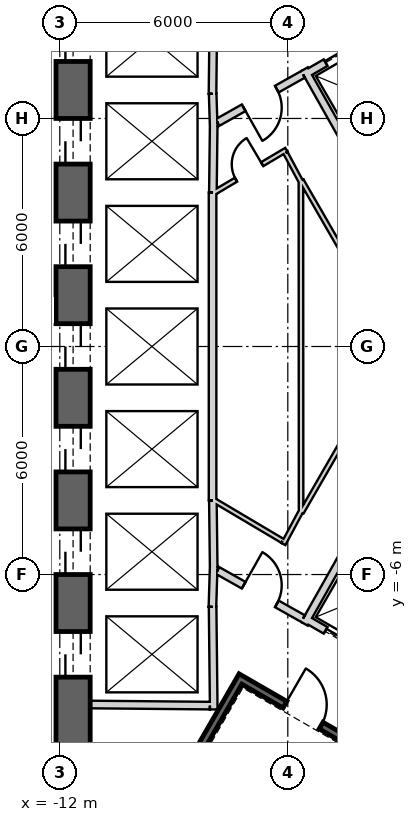
"""IFC4 building model, lengths in metres.
Left out: names, types, materials, properties, quantities, classifications, styles, units other than length and angle.
Written with IfcOpenShell. Run it as: python <this file> out.ifc"""

import sys

from ifc_helpers import new_model, si_unit, direction, frame, frame_2d, origin, place, context, subcontext, project, spatial, rectangle, extrude, element, fill, save


model = new_model("IFC4")
c1 = context("Model", 3, precision=1e-05, world=origin(), true_north=direction((0.0, 1.0)))
c2 = subcontext(c1, "Body", "Model", "MODEL_VIEW")
j1 = project(units=[si_unit("LENGTHUNIT", "METRE"), si_unit("PLANEANGLEUNIT", "RADIAN")], contexts=[c1])
p1 = place(None, origin())
s1 = spatial("IfcSite", under=j1, at=p1, CompositionType="ELEMENT")
p2 = place(p1, origin())
s2 = spatial("IfcBuilding", under=s1, at=p2, CompositionType="ELEMENT")
p3 = place(p2, frame((0.0, 0.0, 298.7)))
s3 = spatial("IfcBuildingStorey", under=s2, at=p3, CompositionType="ELEMENT", Elevation=298.7)
p4 = place(p3, frame((19.475, 2.208, 0.0), z_axis=(0.0, 0.0, 1.0), x_axis=(-0.866028369851, 0.499994862586, 0.0)))
e1 = element("IfcWall", 1, at=p4, inside=s3, PredefinedType="SHEAR", context=c2, shape_type="SweptSolid", body=[
    extrude(rectangle(XDim=31.523, YDim=0.9, at=frame_2d((15.762, 0.0))), origin(), (0.0, 0.0, 1.0), 3.9),
])
p5 = place(p4, frame((7.062, 0.0, 0.0)))
e2 = element("IfcOpeningElement", 2, at=p5, cuts=e1, PredefinedType="OPENING", context=c2, shape_type="SweptSolid", body=[
    extrude(rectangle(XDim=1.2, YDim=2.4, at=frame_2d((0.6, 1.2))), frame((0.0, 0.46, 0.0), z_axis=(0.0, -1.0, 0.0), x_axis=(1.0, 0.0, 0.0)), (0.0, 0.0, 1.0), 0.92),
])
p6 = place(p4, frame((3.612, 0.0, 0.0)))
e3 = element("IfcOpeningElement", 3, at=p6, cuts=e1, PredefinedType="OPENING", context=c2, shape_type="SweptSolid", body=[
    extrude(rectangle(XDim=1.2, YDim=2.4, at=frame_2d((0.6, 1.2))), frame((0.0, 0.46, 0.0), z_axis=(0.0, -1.0, 0.0), x_axis=(1.0, 0.0, 0.0)), (0.0, 0.0, 1.0), 0.92),
])
p7 = place(p4, frame((26.712, 0.0, 0.0)))
e4 = element("IfcOpeningElement", 4, at=p7, cuts=e1, PredefinedType="OPENING", context=c2, shape_type="SweptSolid", body=[
    extrude(rectangle(XDim=1.2, YDim=2.4, at=frame_2d((0.6, 1.2))), frame((0.0, 0.46, 0.0), z_axis=(0.0, -1.0, 0.0), x_axis=(1.0, 0.0, 0.0)), (0.0, 0.0, 1.0), 0.92),
])
p8 = place(p3, frame((-11.65, 15.762, 0.0), z_axis=(0.0, 0.0, 1.0), x_axis=(0.0, -1.0, 0.0)))
e5 = element("IfcWall", 5, at=p8, inside=s3, PredefinedType="SHEAR", context=c2, shape_type="SweptSolid", body=[
    extrude(rectangle(XDim=31.523, YDim=0.9, at=frame_2d((15.762, 0.0))), origin(), (0.0, 0.0, 1.0), 3.9),
])
p9 = place(p8, frame((7.062, 0.0, 0.0)))
e6 = element("IfcOpeningElement", 6, at=p9, cuts=e5, PredefinedType="OPENING", context=c2, shape_type="SweptSolid", body=[
    extrude(rectangle(XDim=1.2, YDim=2.4, at=frame_2d((0.6, 1.2))), frame((0.0, 0.46, 0.0), z_axis=(0.0, -1.0, 0.0), x_axis=(1.0, 0.0, 0.0)), (0.0, 0.0, 1.0), 0.92),
])
p10 = place(p8, frame((9.762, 0.0, 0.0)))
e7 = element("IfcOpeningElement", 7, at=p10, cuts=e5, PredefinedType="OPENING", context=c2, shape_type="SweptSolid", body=[
    extrude(rectangle(XDim=1.2, YDim=2.4, at=frame_2d((0.6, 1.2))), frame((0.0, 0.46, 0.0), z_axis=(0.0, -1.0, 0.0), x_axis=(1.0, 0.0, 0.0)), (0.0, 0.0, 1.0), 0.92),
])
p11 = place(p8, frame((12.462, 0.0, 0.0)))
e8 = element("IfcOpeningElement", 8, at=p11, cuts=e5, PredefinedType="OPENING", context=c2, shape_type="SweptSolid", body=[
    extrude(rectangle(XDim=1.2, YDim=2.4, at=frame_2d((0.6, 1.2))), frame((0.0, 0.46, 0.0), z_axis=(0.0, -1.0, 0.0), x_axis=(1.0, 0.0, 0.0)), (0.0, 0.0, 1.0), 0.92),
])
p12 = place(p8, frame((15.162, 0.0, 0.0)))
e9 = element("IfcOpeningElement", 9, at=p12, cuts=e5, PredefinedType="OPENING", context=c2, shape_type="SweptSolid", body=[
    extrude(rectangle(XDim=1.2, YDim=2.4, at=frame_2d((0.6, 1.2))), frame((0.0, 0.46, 0.0), z_axis=(0.0, -1.0, 0.0), x_axis=(1.0, 0.0, 0.0)), (0.0, 0.0, 1.0), 0.92),
])
p13 = place(p8, frame((17.862, 0.0, 0.0)))
e10 = element("IfcOpeningElement", 10, at=p13, cuts=e5, PredefinedType="OPENING", context=c2, shape_type="SweptSolid", body=[
    extrude(rectangle(XDim=1.2, YDim=2.4, at=frame_2d((0.6, 1.2))), frame((0.0, 0.46, 0.0), z_axis=(0.0, -1.0, 0.0), x_axis=(1.0, 0.0, 0.0)), (0.0, 0.0, 1.0), 0.92),
])
p14 = place(p8, frame((20.562, 0.0, 0.0)))
e11 = element("IfcOpeningElement", 11, at=p14, cuts=e5, PredefinedType="OPENING", context=c2, shape_type="SweptSolid", body=[
    extrude(rectangle(XDim=1.2, YDim=2.4, at=frame_2d((0.6, 1.2))), frame((0.0, 0.46, 0.0), z_axis=(0.0, -1.0, 0.0), x_axis=(1.0, 0.0, 0.0)), (0.0, 0.0, 1.0), 0.92),
])
p15 = place(p8, frame((23.262, 0.0, 0.0)))
e12 = element("IfcOpeningElement", 12, at=p15, cuts=e5, PredefinedType="OPENING", context=c2, shape_type="SweptSolid", body=[
    extrude(rectangle(XDim=1.2, YDim=2.4, at=frame_2d((0.6, 1.2))), frame((0.0, 0.46, 0.0), z_axis=(0.0, -1.0, 0.0), x_axis=(1.0, 0.0, 0.0)), (0.0, 0.0, 1.0), 0.92),
])
p16 = place(p8, frame((3.612, 0.0, 0.0)))
e13 = element("IfcOpeningElement", 13, at=p16, cuts=e5, PredefinedType="OPENING", context=c2, shape_type="SweptSolid", body=[
    extrude(rectangle(XDim=1.2, YDim=2.4, at=frame_2d((0.6, 1.2))), frame((0.0, 0.46, 0.0), z_axis=(0.0, -1.0, 0.0), x_axis=(1.0, 0.0, 0.0)), (0.0, 0.0, 1.0), 0.92),
])
p17 = place(p8, frame((26.712, 0.0, 0.0)))
e14 = element("IfcOpeningElement", 14, at=p17, cuts=e5, PredefinedType="OPENING", context=c2, shape_type="SweptSolid", body=[
    extrude(rectangle(XDim=1.2, YDim=2.4, at=frame_2d((0.6, 1.2))), frame((0.0, 0.46, 0.0), z_axis=(0.0, -1.0, 0.0), x_axis=(1.0, 0.0, 0.0)), (0.0, 0.0, 1.0), 0.92),
])
p18 = place(p3, frame((-7.825, -17.97, 0.0), z_axis=(0.0, 0.0, 1.0), x_axis=(0.866028369851, 0.499994862586, 0.0)))
e15 = element("IfcWall", 15, at=p18, inside=s3, PredefinedType="SHEAR", context=c2, shape_type="SweptSolid", body=[
    extrude(rectangle(XDim=31.523, YDim=0.9, at=frame_2d((15.762, 0.0))), origin(), (0.0, 0.0, 1.0), 3.9),
])
p19 = place(p18, frame((17.862, 0.0, 0.0)))
e16 = element("IfcOpeningElement", 16, at=p19, cuts=e15, PredefinedType="OPENING", context=c2, shape_type="SweptSolid", body=[
    extrude(rectangle(XDim=1.2, YDim=2.4, at=frame_2d((0.6, 1.2))), frame((0.0, 0.46, 0.0), z_axis=(0.0, -1.0, 0.0), x_axis=(1.0, 0.0, 0.0)), (0.0, 0.0, 1.0), 0.92),
])
p20 = place(p18, frame((20.562, 0.0, 0.0)))
e17 = element("IfcOpeningElement", 17, at=p20, cuts=e15, PredefinedType="OPENING", context=c2, shape_type="SweptSolid", body=[
    extrude(rectangle(XDim=1.2, YDim=2.4, at=frame_2d((0.6, 1.2))), frame((0.0, 0.46, 0.0), z_axis=(0.0, -1.0, 0.0), x_axis=(1.0, 0.0, 0.0)), (0.0, 0.0, 1.0), 0.92),
])
p21 = place(p18, frame((26.712, 0.0, 0.0)))
e18 = element("IfcOpeningElement", 18, at=p21, cuts=e15, PredefinedType="OPENING", context=c2, shape_type="SweptSolid", body=[
    extrude(rectangle(XDim=1.2, YDim=2.4, at=frame_2d((0.6, 1.2))), frame((0.0, 0.46, 0.0), z_axis=(0.0, -1.0, 0.0), x_axis=(1.0, 0.0, 0.0)), (0.0, 0.0, 1.0), 0.92),
])
p22 = place(p18, frame((3.612, 0.0, 0.0)))
e19 = element("IfcOpeningElement", 19, at=p22, cuts=e15, PredefinedType="OPENING", context=c2, shape_type="SweptSolid", body=[
    extrude(rectangle(XDim=1.2, YDim=2.4, at=frame_2d((0.6, 1.2))), frame((0.0, 0.46, 0.0), z_axis=(0.0, -1.0, 0.0), x_axis=(1.0, 0.0, 0.0)), (0.0, 0.0, 1.0), 0.92),
])
p23 = place(p3, frame((-7.951, 9.35, 0.0), z_axis=(0.0, 0.0, 1.0), x_axis=(-0.011120469654, -0.999938165666, 0.0)))
e20 = element("IfcWall", 20, at=p23, inside=s3, PredefinedType="PLUMBINGWALL", context=c2, shape_type="SweptSolid", body=[
    extrude(rectangle(XDim=2.7, YDim=0.2, at=frame_2d((1.35, 0.0))), origin(), (0.0, 0.0, 1.0), 3.6),
])
p24 = place(p3, frame((-7.977, 6.65, 0.0), z_axis=(0.0, 0.0, 1.0), x_axis=(0.030861509705, -0.999523670164, 0.0)))
e21 = element("IfcWall", 21, at=p24, inside=s3, PredefinedType="PLUMBINGWALL", context=c2, shape_type="SweptSolid", body=[
    extrude(rectangle(XDim=0.878, YDim=0.2, at=frame_2d((0.439, 0.0))), origin(), (0.0, 0.0, 1.0), 3.6),
])
p25 = place(p3, frame((-7.949, 5.895, 0.0), z_axis=(0.0, 0.0, 1.0), x_axis=(-0.012042535896, -0.999927486035, 0.0)))
e22 = element("IfcWall", 22, at=p25, inside=s3, PredefinedType="PLUMBINGWALL", context=c2, shape_type="SweptSolid", body=[
    extrude(rectangle(XDim=1.845, YDim=0.2, at=frame_2d((0.922, 0.0))), origin(), (0.0, 0.0, 1.0), 3.6),
])
p26 = place(p3, frame((-7.98, 4.05, 0.0), z_axis=(0.0, 0.0, 1.0), x_axis=(0.0, -1.0, 0.0)))
e23 = element("IfcWall", 23, at=p26, inside=s3, PredefinedType="PLUMBINGWALL", context=c2, shape_type="SweptSolid", body=[
    extrude(rectangle(XDim=8.1, YDim=0.2, at=frame_2d((4.05, 0.0))), origin(), (0.0, 0.0, 1.0), 3.6),
])
p27 = place(p3, frame((-7.95, -5.772, 0.0), z_axis=(0.0, 0.0, 1.0), x_axis=(-0.030803413295, -0.999525462272, 0.0)))
e24 = element("IfcWall", 24, at=p27, inside=s3, PredefinedType="PLUMBINGWALL", context=c2, shape_type="SweptSolid", body=[
    extrude(rectangle(XDim=1.078, YDim=0.2, at=frame_2d((0.539, 0.0))), origin(), (0.0, 0.0, 1.0), 3.6),
])
p28 = place(p3, frame((-7.971, -4.05, 0.0), z_axis=(0.0, 0.0, 1.0), x_axis=(0.012042535896, -0.999927486035, 0.0)))
e25 = element("IfcWall", 25, at=p28, inside=s3, PredefinedType="PLUMBINGWALL", context=c2, shape_type="SweptSolid", body=[
    extrude(rectangle(XDim=1.845, YDim=0.2, at=frame_2d((0.922, 0.0))), origin(), (0.0, 0.0, 1.0), 3.6),
])
p29 = place(p3, frame((-7.979, -6.85, 0.0), z_axis=(0.0, 0.0, 1.0), x_axis=(0.011121475088, -0.999938154483, 0.0)))
e26 = element("IfcWall", 26, at=p29, inside=s3, PredefinedType="PLUMBINGWALL", context=c2, shape_type="SweptSolid", body=[
    extrude(rectangle(XDim=2.7, YDim=0.2, at=frame_2d((1.35, 0.0))), origin(), (0.0, 0.0, 1.0), 3.6),
])
p30 = place(p3, frame((-8.05, -9.449, 0.0), z_axis=(0.0, 0.0, 1.0), x_axis=(-0.999957467379, 0.009222983926, 0.0)))
e27 = element("IfcWall", 27, at=p30, inside=s3, PredefinedType="PLUMBINGWALL", context=c2, shape_type="SweptSolid", body=[
    extrude(rectangle(XDim=3.15, YDim=0.2, at=frame_2d((1.575, 0.0))), origin(), (0.0, 0.0, 1.0), 3.6),
])
p31 = place(p3, frame((-5.524, 7.168, 0.0), z_axis=(0.0, 0.0, 1.0), x_axis=(0.866024647952, 0.500001309137, 0.0)))
e28 = element("IfcWall", 28, at=p31, inside=s3, PredefinedType="PLUMBINGWALL", context=c2, shape_type="SweptSolid", body=[
    extrude(rectangle(XDim=2.4, YDim=0.2, at=frame_2d((1.2, 0.0))), origin(), (0.0, 0.0, 1.0), 3.6),
])
p32 = place(p31, frame((0.6, 0.0, 0.0)))
e29 = element("IfcOpeningElement", 29, at=p32, cuts=e28, PredefinedType="OPENING", context=c2, shape_type="SweptSolid", body=[
    extrude(rectangle(XDim=1.2, YDim=2.4, at=frame_2d((0.6, 1.2))), frame((0.0, 0.11, 0.0), z_axis=(0.0, -1.0, 0.0), x_axis=(1.0, 0.0, 0.0)), (0.0, 0.0, 1.0), 0.22),
])
p33 = place(p3, frame((-5.562, 7.296, 0.0), z_axis=(0.0, 0.0, 1.0), x_axis=(0.49134651263, -0.870964180966, 0.0)))
e30 = element("IfcWall", 30, at=p33, inside=s3, PredefinedType="PLUMBINGWALL", context=c2, shape_type="SweptSolid", body=[
    extrude(rectangle(XDim=3.0, YDim=0.2, at=frame_2d((1.5, 0.0))), origin(), (0.0, 0.0, 1.0), 3.6),
])
p34 = place(p3, frame((-7.196, -8.663, -0.3), z_axis=(0.0, 0.0, 1.0), x_axis=(-0.499997992926, -0.866026562566, 0.0)))
e31 = element("IfcWall", 31, at=p34, inside=s3, PredefinedType="SHEAR", context=c2, shape_type="SweptSolid", body=[
    extrude(rectangle(XDim=7.9, YDim=0.2, at=frame_2d((3.95, 0.0))), origin(), (0.0, 0.0, 1.0), 3.9),
])
p35 = place(p3, frame((-4.041, -10.599, -0.3), z_axis=(0.0, 0.0, 1.0), x_axis=(-0.866047807691, 0.499961193289, 0.0)))
e32 = element("IfcWall", 32, at=p35, inside=s3, PredefinedType="SHEAR", context=c2, shape_type="SweptSolid", body=[
    extrude(rectangle(XDim=3.6, YDim=0.2, at=frame_2d((1.8, 0.0))), origin(), (0.0, 0.0, 1.0), 3.9),
])
p36 = place(p35, frame((1.25, 0.0, 0.3)))
e33 = element("IfcOpeningElement", 33, at=p36, cuts=e32, PredefinedType="OPENING", context=c2, shape_type="SweptSolid", body=[
    extrude(rectangle(XDim=1.1, YDim=2.1, at=frame_2d((0.55, 1.05))), frame((0.0, 0.11, 0.0), z_axis=(0.0, -1.0, 0.0), x_axis=(1.0, 0.0, 0.0)), (0.0, 0.0, 1.0), 0.22),
])
p37 = place(p3, frame((-3.446, -8.368, 0.0), z_axis=(0.0, 0.0, 1.0), x_axis=(-0.866024647952, 0.500001309137, 0.0)))
e34 = element("IfcWall", 34, at=p37, inside=s3, PredefinedType="PLUMBINGWALL", context=c2, shape_type="SweptSolid", body=[
    extrude(rectangle(XDim=2.4, YDim=0.2, at=frame_2d((1.2, 0.0))), origin(), (0.0, 0.0, 1.0), 3.6),
])
p38 = place(p37, frame((0.6, 0.0, 0.0)))
e35 = element("IfcOpeningElement", 35, at=p38, cuts=e34, PredefinedType="OPENING", context=c2, shape_type="SweptSolid", body=[
    extrude(rectangle(XDim=1.2, YDim=2.4, at=frame_2d((0.6, 1.2))), frame((0.0, 0.11, 0.0), z_axis=(0.0, -1.0, 0.0), x_axis=(1.0, 0.0, 0.0)), (0.0, 0.0, 1.0), 0.22),
])
p39 = place(p3, frame((-3.99, -4.509, 0.0), z_axis=(0.0, 0.0, 1.0), x_axis=(-0.491358283181, -0.870957540612, 0.0)))
e36 = element("IfcWall", 36, at=p39, inside=s3, PredefinedType="PLUMBINGWALL", context=c2, shape_type="SweptSolid", body=[
    extrude(rectangle(XDim=3.2, YDim=0.2, at=frame_2d((1.6, 0.0))), origin(), (0.0, 0.0, 1.0), 3.6),
])
p40 = place(p3, frame((-5.6, 7.16, 0.0), z_axis=(0.0, 0.0, 1.0), x_axis=(-0.871363259478, -0.490638431059, 0.0)))
e37 = element("IfcWall", 37, at=p40, inside=s3, PredefinedType="PARTITIONING", context=c2, shape_type="SweptSolid", body=[
    extrude(rectangle(XDim=2.581, YDim=0.2, at=frame_2d((1.291, 0.0))), origin(), (0.0, 0.0, 1.0), 3.6),
])
p41 = place(p40, frame((0.791, 0.0, 0.0)))
e38 = element("IfcOpeningElement", 38, at=p41, cuts=e37, PredefinedType="OPENING", context=c2, shape_type="SweptSolid", body=[
    extrude(rectangle(XDim=1.0, YDim=2.1, at=frame_2d((0.5, 1.05))), frame((0.0, 0.11, 0.0), z_axis=(0.0, -1.0, 0.0), x_axis=(1.0, 0.0, 0.0)), (0.0, 0.0, 1.0), 0.22),
])
p42 = place(p3, frame((-7.849, -5.894, 0.0), z_axis=(0.0, 0.0, 1.0), x_axis=(0.871363259478, -0.490638431059, 0.0)))
e39 = element("IfcWall", 39, at=p42, inside=s3, PredefinedType="PARTITIONING", context=c2, shape_type="SweptSolid", body=[
    extrude(rectangle(XDim=2.581, YDim=0.2, at=frame_2d((1.291, 0.0))), origin(), (0.0, 0.0, 1.0), 3.6),
])
p43 = place(p42, frame((0.791, 0.0, 0.0)))
e40 = element("IfcOpeningElement", 40, at=p43, cuts=e39, PredefinedType="OPENING", context=c2, shape_type="SweptSolid", body=[
    extrude(rectangle(XDim=1.0, YDim=2.1, at=frame_2d((0.5, 1.05))), frame((0.0, 0.11, 0.0), z_axis=(0.0, -1.0, 0.0), x_axis=(1.0, 0.0, 0.0)), (0.0, 0.0, 1.0), 0.22),
])
p44 = place(p3, frame((-5.651, -4.388, 0.0), z_axis=(0.0, 0.0, 1.0), x_axis=(-0.000472563465, 0.999999888342, 0.0)))
e41 = element("IfcWall", 41, at=p44, inside=s3, PredefinedType="PARTITIONING", context=c2, shape_type="SweptSolid", body=[
    extrude(rectangle(XDim=8.783, YDim=0.12, at=frame_2d((4.391, 0.0))), origin(), (0.0, 0.0, 1.0), 3.6),
])
p45 = place(p3, frame((-6.117, -5.198, 0.0), z_axis=(0.0, 0.0, 1.0), x_axis=(0.473067931341, 0.881025954406, 0.0)))
e42 = element("IfcWall", 42, at=p45, inside=s3, PredefinedType="PARTITIONING", context=c2, shape_type="SweptSolid", body=[
    extrude(rectangle(XDim=1.016, YDim=0.12, at=frame_2d((0.508, 0.0))), origin(), (0.0, 0.0, 1.0), 3.6),
])
p46 = place(p3, frame((-7.95, -4.041, 0.0), z_axis=(0.0, 0.0, 1.0), x_axis=(0.860112457103, -0.510104461004, 0.0)))
e43 = element("IfcWall", 43, at=p46, inside=s3, PredefinedType="PARTITIONING", context=c2, shape_type="SweptSolid", body=[
    extrude(rectangle(XDim=2.104, YDim=0.12, at=frame_2d((1.052, 0.0))), origin(), (0.0, 0.0, 1.0), 3.6),
])
p47 = place(p3, frame((-6.037, 5.176, 0.0), z_axis=(0.0, 0.0, 1.0), x_axis=(-0.860106072674, -0.510115225953, 0.0)))
e44 = element("IfcWall", 44, at=p47, inside=s3, PredefinedType="PARTITIONING", context=c2, shape_type="SweptSolid", body=[
    extrude(rectangle(XDim=2.225, YDim=0.12, at=frame_2d((1.112, 0.0))), origin(), (0.0, 0.0, 1.0), 3.6),
])
p48 = place(p47, frame((0.742, 0.0, 0.0)))
e45 = element("IfcOpeningElement", 45, at=p48, cuts=e44, PredefinedType="OPENING", context=c2, shape_type="SweptSolid", body=[
    extrude(rectangle(XDim=0.8, YDim=2.1, at=frame_2d((0.4, 1.05))), frame((0.0, 0.07, 0.0), z_axis=(0.0, -1.0, 0.0), x_axis=(1.0, 0.0, 0.0)), (0.0, 0.0, 1.0), 0.14),
])
p49 = place(p3, frame((-5.64, 4.31, 0.0), z_axis=(0.0, 0.0, 1.0), x_axis=(-0.472770828932, 0.88118541937, 0.0)))
e46 = element("IfcWall", 46, at=p49, inside=s3, PredefinedType="PARTITIONING", context=c2, shape_type="SweptSolid", body=[
    extrude(rectangle(XDim=0.888, YDim=0.12, at=frame_2d((0.444, 0.0))), origin(), (0.0, 0.0, 1.0), 3.6),
])
p50 = place(p3, frame((-4.558, 2.495, 0.0), z_axis=(0.0, 0.0, 1.0), x_axis=(-0.499986178718, 0.866033383358, 0.0)))
e47 = element("IfcWall", 47, at=p50, inside=s3, PredefinedType="PARTITIONING", context=c2, shape_type="SweptSolid", body=[
    extrude(rectangle(XDim=2.164, YDim=0.12, at=frame_2d((1.082, 0.0))), origin(), (0.0, 0.0, 1.0), 3.6),
])
p51 = place(p3, frame((-5.636, -4.362, 0.0), z_axis=(0.0, 0.0, 1.0), x_axis=(0.500099717341, 0.865967824295, 0.0)))
e48 = element("IfcWall", 48, at=p51, inside=s3, PredefinedType="PARTITIONING", context=c2, shape_type="SweptSolid", body=[
    extrude(rectangle(XDim=2.035, YDim=0.12, at=frame_2d((1.018, 0.0))), origin(), (0.0, 0.0, 1.0), 3.6),
])
p52 = place(p41, origin())
e49 = element("IfcDoor", 49, at=p52, inside=s3, OperationType="SINGLE_SWING_RIGHT", PredefinedType="USERDEFINED", context=c2, shape_type="SweptSolid", body=[
    extrude(rectangle(XDim=1.0, YDim=2.1, at=frame_2d((0.5, 1.05))), frame((0.0, 0.025, 0.0), z_axis=(0.0, -1.0, 0.0), x_axis=(1.0, 0.0, 0.0)), (0.0, 0.0, 1.0), 0.05),
])
fill(e38, e49)
p53 = place(p32, origin())
e50 = element("IfcDoor", 50, at=p53, inside=s3, OperationType="SLIDING_TO_LEFT", PredefinedType="USERDEFINED", context=c2, shape_type="SweptSolid", body=[
    extrude(rectangle(XDim=1.2, YDim=2.4, at=frame_2d((0.6, 1.2))), frame((0.0, 0.025, 0.0), z_axis=(0.0, -1.0, 0.0), x_axis=(1.0, 0.0, 0.0)), (0.0, 0.0, 1.0), 0.05),
])
fill(e29, e50)
p54 = place(p36, origin())
e51 = element("IfcDoor", 51, at=p54, inside=s3, OperationType="SINGLE_SWING_RIGHT", PredefinedType="USERDEFINED", context=c2, shape_type="SweptSolid", body=[
    extrude(rectangle(XDim=1.1, YDim=2.1, at=frame_2d((0.55, 1.05))), frame((0.0, 0.025, 0.0), z_axis=(0.0, -1.0, 0.0), x_axis=(1.0, 0.0, 0.0)), (0.0, 0.0, 1.0), 0.05),
])
fill(e33, e51)
p55 = place(p43, origin())
e52 = element("IfcDoor", 52, at=p55, inside=s3, OperationType="SINGLE_SWING_RIGHT", PredefinedType="USERDEFINED", context=c2, shape_type="SweptSolid", body=[
    extrude(rectangle(XDim=1.0, YDim=2.1, at=frame_2d((0.5, 1.05))), frame((0.0, 0.025, 0.0), z_axis=(0.0, -1.0, 0.0), x_axis=(1.0, 0.0, 0.0)), (0.0, 0.0, 1.0), 0.05),
])
fill(e40, e52)
p56 = place(p38, origin())
e53 = element("IfcDoor", 53, at=p56, inside=s3, OperationType="SLIDING_TO_LEFT", PredefinedType="USERDEFINED", context=c2, shape_type="SweptSolid", body=[
    extrude(rectangle(XDim=1.2, YDim=2.4, at=frame_2d((0.6, 1.2))), frame((0.0, 0.025, 0.0), z_axis=(0.0, -1.0, 0.0), x_axis=(1.0, 0.0, 0.0)), (0.0, 0.0, 1.0), 0.05),
])
fill(e35, e53)
p57 = place(p48, origin())
e54 = element("IfcDoor", 54, at=p57, inside=s3, OperationType="SINGLE_SWING_RIGHT", PredefinedType="USERDEFINED", context=c2, shape_type="SweptSolid", body=[
    extrude(rectangle(XDim=0.8, YDim=2.1, at=frame_2d((0.4, 1.05))), frame((0.0, 0.025, 0.0), z_axis=(0.0, -1.0, 0.0), x_axis=(1.0, 0.0, 0.0)), (0.0, 0.0, 1.0), 0.05),
])
fill(e45, e54)
p58 = place(p9, origin())
e55 = element("IfcDoor", 55, at=p58, inside=s3, OperationType="SLIDING_TO_LEFT", PredefinedType="USERDEFINED", context=c2, shape_type="SweptSolid", body=[
    extrude(rectangle(XDim=1.2, YDim=2.4, at=frame_2d((0.6, 1.2))), frame((0.0, 0.025, 0.0), z_axis=(0.0, -1.0, 0.0), x_axis=(1.0, 0.0, 0.0)), (0.0, 0.0, 1.0), 0.05),
])
fill(e6, e55)
p59 = place(p10, origin())
e56 = element("IfcDoor", 56, at=p59, inside=s3, OperationType="SLIDING_TO_LEFT", PredefinedType="USERDEFINED", context=c2, shape_type="SweptSolid", body=[
    extrude(rectangle(XDim=1.2, YDim=2.4, at=frame_2d((0.6, 1.2))), frame((0.0, 0.025, 0.0), z_axis=(0.0, -1.0, 0.0), x_axis=(1.0, 0.0, 0.0)), (0.0, 0.0, 1.0), 0.05),
])
fill(e7, e56)
p60 = place(p11, origin())
e57 = element("IfcDoor", 57, at=p60, inside=s3, OperationType="SLIDING_TO_LEFT", PredefinedType="USERDEFINED", context=c2, shape_type="SweptSolid", body=[
    extrude(rectangle(XDim=1.2, YDim=2.4, at=frame_2d((0.6, 1.2))), frame((0.0, 0.025, 0.0), z_axis=(0.0, -1.0, 0.0), x_axis=(1.0, 0.0, 0.0)), (0.0, 0.0, 1.0), 0.05),
])
fill(e8, e57)
p61 = place(p12, origin())
e58 = element("IfcDoor", 58, at=p61, inside=s3, OperationType="SLIDING_TO_LEFT", PredefinedType="USERDEFINED", context=c2, shape_type="SweptSolid", body=[
    extrude(rectangle(XDim=1.2, YDim=2.4, at=frame_2d((0.6, 1.2))), frame((0.0, 0.025, 0.0), z_axis=(0.0, -1.0, 0.0), x_axis=(1.0, 0.0, 0.0)), (0.0, 0.0, 1.0), 0.05),
])
fill(e9, e58)
p62 = place(p13, origin())
e59 = element("IfcDoor", 59, at=p62, inside=s3, OperationType="SLIDING_TO_LEFT", PredefinedType="USERDEFINED", context=c2, shape_type="SweptSolid", body=[
    extrude(rectangle(XDim=1.2, YDim=2.4, at=frame_2d((0.6, 1.2))), frame((0.0, 0.025, 0.0), z_axis=(0.0, -1.0, 0.0), x_axis=(1.0, 0.0, 0.0)), (0.0, 0.0, 1.0), 0.05),
])
fill(e10, e59)
p63 = place(p14, origin())
e60 = element("IfcDoor", 60, at=p63, inside=s3, OperationType="SLIDING_TO_LEFT", PredefinedType="USERDEFINED", context=c2, shape_type="SweptSolid", body=[
    extrude(rectangle(XDim=1.2, YDim=2.4, at=frame_2d((0.6, 1.2))), frame((0.0, 0.025, 0.0), z_axis=(0.0, -1.0, 0.0), x_axis=(1.0, 0.0, 0.0)), (0.0, 0.0, 1.0), 0.05),
])
fill(e11, e60)
p64 = place(p15, origin())
e61 = element("IfcDoor", 61, at=p64, inside=s3, OperationType="SLIDING_TO_LEFT", PredefinedType="USERDEFINED", context=c2, shape_type="SweptSolid", body=[
    extrude(rectangle(XDim=1.2, YDim=2.4, at=frame_2d((0.6, 1.2))), frame((0.0, 0.025, 0.0), z_axis=(0.0, -1.0, 0.0), x_axis=(1.0, 0.0, 0.0)), (0.0, 0.0, 1.0), 0.05),
])
fill(e12, e61)
save(model, sys.argv[1])
